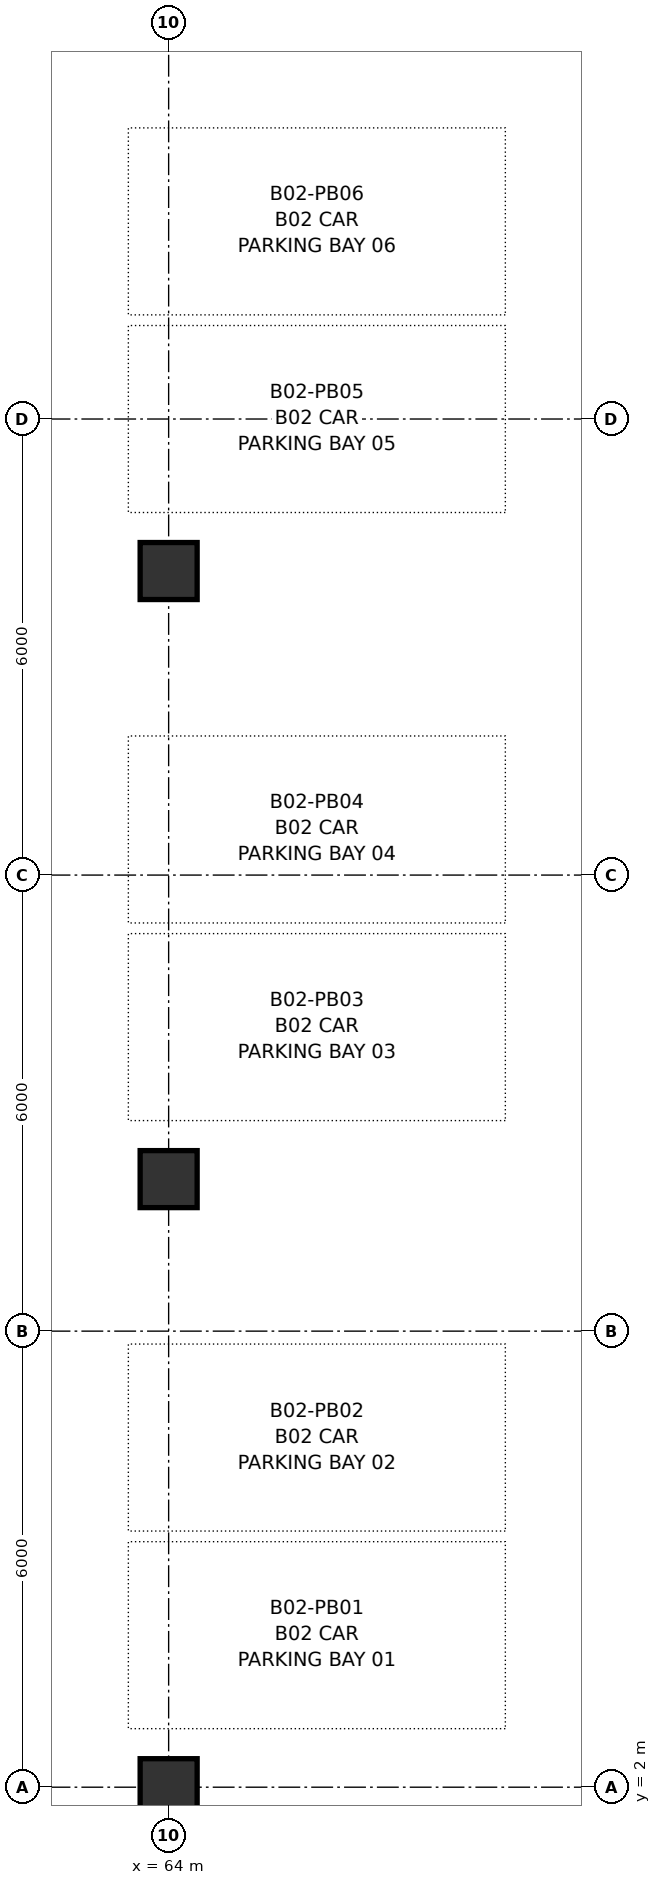
"""IFC4 building model, lengths in metres.
Left out: names, types, materials, properties, quantities, classifications, styles, units other than length and angle.
Written with IfcOpenShell. Run it as: python <this file> out.ifc"""

import sys

from ifc_helpers import new_model, si_unit, direction, frame, origin, origin_2d, place, context, subcontext, project, spatial, rectangle, extrude, source, transform, mapped, element, save


model = new_model("IFC4")
c1 = context("Model", 3, precision=1e-05, world=origin(), true_north=direction((0.0, 1.0)))
c2 = subcontext(c1, "Body", "Model", "MODEL_VIEW")
j1 = project(units=[si_unit("LENGTHUNIT", "METRE"), si_unit("PLANEANGLEUNIT", "RADIAN")], contexts=[c1])
p1 = place(None, origin())
s1 = spatial("IfcSite", under=j1, at=p1, CompositionType="ELEMENT")
p2 = place(p1, origin())
s2 = spatial("IfcBuilding", under=s1, at=p2, CompositionType="ELEMENT")
p3 = place(p2, frame((0.0, 0.0, -8.7)))
s3 = spatial("IfcBuildingStorey", under=s2, at=p3, CompositionType="ELEMENT", Elevation=-8.7)
m1 = source(origin(), c2, "Body", "SweptSolid", [
    extrude(rectangle(XDim=0.75, YDim=0.75, at=origin_2d()), origin(), (0.0, 0.0, 1.0), 4.2),
])
for number, where, z_axis, x_axis in (
    (1, (64.0, 2.0, 0.0), (0.0, 0.0, 1.0), (1.0, 0.0, 0.0)),
    (2, (64.0, 10.0, 0.0), (0.0, 0.0, 1.0), (1.0, 0.0, 0.0)),
    (3, (64.0, 18.0, 0.0), (0.0, 0.0, 1.0), (1.0, 0.0, 0.0)),
):
    element("IfcColumn", number, at=place(p3, frame(where, z_axis=z_axis, x_axis=x_axis)), inside=s3, PredefinedType="COLUMN", context=c2, shape_type="MappedRepresentation", body=[
        mapped(m1, transform((0.0, 0.0, 0.0), x_axis=(1.0, 0.0, 0.0), y_axis=(0.0, 1.0, 0.0), z_axis=(0.0, 0.0, 1.0), scale=1.0)),
    ])
save(model, sys.argv[1])
